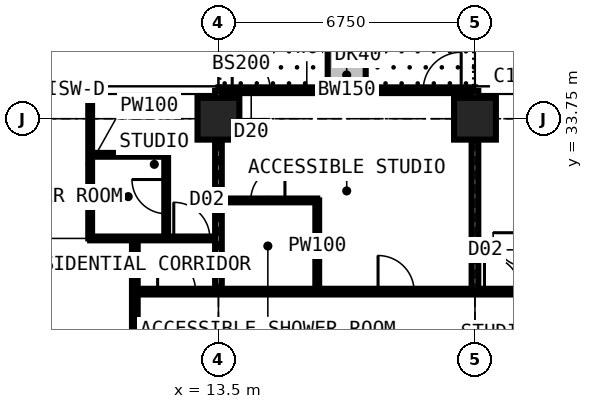
"""IFC4 building model, lengths in metres.
Left out: names, types, materials, properties, quantities, classifications, styles, units other than length and angle.
Written with IfcOpenShell. Run it as: python <this file> out.ifc"""

import sys

from ifc_helpers import new_model, si_unit, direction, frame, frame_2d, origin, origin_2d, place, context, subcontext, project, spatial, rectangle, extrude, element, fill, save


model = new_model("IFC4")
c1 = context("Model", 3, precision=1e-05, world=origin(), true_north=direction((0.0, 1.0)))
c2 = subcontext(c1, "Body", "Model", "MODEL_VIEW")
j1 = project(units=[si_unit("LENGTHUNIT", "METRE"), si_unit("PLANEANGLEUNIT", "RADIAN")], contexts=[c1])
p1 = place(None, origin())
s1 = spatial("IfcSite", under=j1, at=p1, CompositionType="ELEMENT")
p2 = place(p1, origin())
s2 = spatial("IfcBuilding", under=s1, at=p2, CompositionType="ELEMENT")
p3 = place(p2, frame((0.0, 0.0, 218.7)))
s3 = spatial("IfcBuildingStorey", under=s2, at=p3, CompositionType="ELEMENT", Elevation=218.7)
for number, where, z_axis, x_axis in (
    (1, (13.5, 33.75, 0.0), (0.0, 0.0, 1.0), (1.0, 0.0, 0.0)),
    (2, (20.25, 33.75, 0.0), (0.0, 0.0, 1.0), (1.0, 0.0, 0.0)),
):
    element("IfcColumn", number, at=place(p3, frame(where, z_axis=z_axis, x_axis=x_axis)), inside=s3, PredefinedType="COLUMN", context=c2, shape_type="SweptSolid", body=[
        extrude(rectangle(XDim=1.1, YDim=1.1, at=origin_2d()), origin(), (0.0, 0.0, 1.0), 3.6),
    ])
p4 = place(p3, frame((13.5, 34.5, 0.0), z_axis=(0.0, 0.0, 1.0), x_axis=(1.0, 0.0, 0.0)))
e3 = element("IfcWall", 3, at=p4, inside=s3, PredefinedType="SOLIDWALL", context=c2, shape_type="SweptSolid", body=[
    extrude(rectangle(XDim=6.75, YDim=0.15, at=frame_2d((3.375, 0.0))), origin(), (0.0, 0.0, 1.0), 3.375),
])
p5 = place(p4, frame((0.363, 0.0, 0.0)))
e4 = element("IfcOpeningElement", 4, at=p5, cuts=e3, PredefinedType="OPENING", context=c2, shape_type="SweptSolid", body=[
    extrude(rectangle(XDim=1.0, YDim=2.2, at=frame_2d((0.5, 1.1))), frame((0.0, 0.085, 0.0), z_axis=(0.0, -1.0, 0.0), x_axis=(1.0, 0.0, 0.0)), (0.0, 0.0, 1.0), 0.17),
])
p6 = place(p4, frame((1.725, 0.0, 0.9)))
e5 = element("IfcOpeningElement", 5, at=p6, cuts=e3, PredefinedType="OPENING", context=c2, shape_type="SweptSolid", body=[
    extrude(rectangle(XDim=1.2, YDim=1.8, at=frame_2d((0.6, 0.9))), frame((0.0, 0.085, 0.0), z_axis=(0.0, -1.0, 0.0), x_axis=(1.0, 0.0, 0.0)), (0.0, 0.0, 1.0), 0.17),
])
p7 = place(p4, frame((5.387, 0.0, 0.0)))
e6 = element("IfcOpeningElement", 6, at=p7, cuts=e3, PredefinedType="OPENING", context=c2, shape_type="SweptSolid", body=[
    extrude(rectangle(XDim=1.0, YDim=2.2, at=frame_2d((0.5, 1.1))), frame((0.0, 0.085, 0.0), z_axis=(0.0, -1.0, 0.0), x_axis=(1.0, 0.0, 0.0)), (0.0, 0.0, 1.0), 0.17),
])
p8 = place(p4, frame((3.825, 0.0, 0.9)))
e7 = element("IfcOpeningElement", 7, at=p8, cuts=e3, PredefinedType="OPENING", context=c2, shape_type="SweptSolid", body=[
    extrude(rectangle(XDim=1.2, YDim=1.8, at=frame_2d((0.6, 0.9))), frame((0.0, 0.085, 0.0), z_axis=(0.0, -1.0, 0.0), x_axis=(1.0, 0.0, 0.0)), (0.0, 0.0, 1.0), 0.17),
])
p9 = place(p3, frame((16.875, 34.6, 0.0), z_axis=(0.0, 0.0, 1.0), x_axis=(0.0, 1.0, 0.0)))
e8 = element("IfcWall", 8, at=p9, inside=s3, PredefinedType="USERDEFINED", context=c2, shape_type="SweptSolid", body=[
    extrude(rectangle(XDim=2.2, YDim=1.0, at=frame_2d((1.1, 0.0))), origin(), (0.0, 0.0, 1.0), 0.9),
])
p10 = place(p3, frame((10.125, 30.6, 0.0), z_axis=(0.0, 0.0, 1.0), x_axis=(0.0, 1.0, 0.0)))
e9 = element("IfcWall", 9, at=p10, inside=s3, PredefinedType="PARTITIONING", context=c2, shape_type="SweptSolid", body=[
    extrude(rectangle(XDim=3.884, YDim=0.1, at=frame_2d((1.942, 0.0))), origin(), (0.0, 0.0, 1.0), 3.375),
])
p11 = place(p3, frame((10.125, 30.6, 0.0), z_axis=(0.0, 0.0, 1.0), x_axis=(1.0, 0.0, 0.0)))
e10 = element("IfcWall", 10, at=p11, inside=s3, PredefinedType="PARTITIONING", context=c2, shape_type="SweptSolid", body=[
    extrude(rectangle(XDim=3.375, YDim=0.1, at=frame_2d((1.688, 0.0))), origin(), (0.0, 0.0, 1.0), 3.375),
])
p12 = place(p11, frame((2.2, 0.0, 0.0)))
e11 = element("IfcOpeningElement", 11, at=p12, cuts=e10, PredefinedType="OPENING", context=c2, shape_type="SweptSolid", body=[
    extrude(rectangle(XDim=0.95, YDim=2.2, at=frame_2d((0.475, 1.1))), frame((0.0, 0.06, 0.0), z_axis=(0.0, -1.0, 0.0), x_axis=(1.0, 0.0, 0.0)), (0.0, 0.0, 1.0), 0.12),
])
p13 = place(p3, frame((10.125, 32.8, 0.0), z_axis=(0.0, 0.0, 1.0), x_axis=(1.0, 0.0, 0.0)))
e12 = element("IfcWall", 12, at=p13, inside=s3, PredefinedType="PARTITIONING", context=c2, shape_type="SweptSolid", body=[
    extrude(rectangle(XDim=2.0, YDim=0.1, at=frame_2d((1.0, 0.0))), origin(), (0.0, 0.0, 1.0), 3.375),
])
p14 = place(p3, frame((11.3, 11.3, 0.0), z_axis=(0.0, 0.0, 1.0), x_axis=(0.0, 1.0, 0.0)))
e13 = element("IfcWall", 13, at=p14, inside=s3, PredefinedType="PARTITIONING", context=c2, shape_type="SweptSolid", body=[
    extrude(rectangle(XDim=19.3, YDim=0.15, at=frame_2d((9.65, 0.0))), origin(), (0.0, 0.0, 1.0), 3.375),
])
p15 = place(p14, frame((13.525, 0.0, 0.0)))
e14 = element("IfcOpeningElement", 14, at=p15, cuts=e13, PredefinedType="OPENING", context=c2, shape_type="SweptSolid", body=[
    extrude(rectangle(XDim=1.0, YDim=2.2, at=frame_2d((0.5, 1.1))), frame((0.0, 0.085, 0.0), z_axis=(0.0, -1.0, 0.0), x_axis=(1.0, 0.0, 0.0)), (0.0, 0.0, 1.0), 0.17),
])
p16 = place(p14, frame((10.438, 0.0, 0.0)))
e15 = element("IfcOpeningElement", 15, at=p16, cuts=e13, PredefinedType="OPENING", context=c2, shape_type="SweptSolid", body=[
    extrude(rectangle(XDim=1.0, YDim=2.2, at=frame_2d((0.5, 1.1))), frame((0.0, 0.085, 0.0), z_axis=(0.0, -1.0, 0.0), x_axis=(1.0, 0.0, 0.0)), (0.0, 0.0, 1.0), 0.17),
])
p17 = place(p3, frame((11.3, 29.2, 0.0), z_axis=(0.0, 0.0, 1.0), x_axis=(1.0, 0.0, 0.0)))
e16 = element("IfcWall", 16, at=p17, inside=s3, PredefinedType="PARTITIONING", context=c2, shape_type="SweptSolid", body=[
    extrude(rectangle(XDim=19.809, YDim=0.15, at=frame_2d((9.904, 0.0))), origin(), (0.0, 0.0, 1.0), 3.375),
])
p18 = place(p17, frame((14.625, 0.0, 0.0)))
e17 = element("IfcOpeningElement", 17, at=p18, cuts=e16, PredefinedType="OPENING", context=c2, shape_type="SweptSolid", body=[
    extrude(rectangle(XDim=1.0, YDim=2.2, at=frame_2d((0.5, 1.1))), frame((0.0, 0.085, 0.0), z_axis=(0.0, -1.0, 0.0), x_axis=(1.0, 0.0, 0.0)), (0.0, 0.0, 1.0), 0.17),
])
p19 = place(p17, frame((6.4, 0.0, 0.0)))
e18 = element("IfcOpeningElement", 18, at=p19, cuts=e16, PredefinedType="OPENING", context=c2, shape_type="SweptSolid", body=[
    extrude(rectangle(XDim=0.95, YDim=2.2, at=frame_2d((0.475, 1.1))), frame((0.0, 0.085, 0.0), z_axis=(0.0, -1.0, 0.0), x_axis=(1.0, 0.0, 0.0)), (0.0, 0.0, 1.0), 0.17),
])
p20 = place(p17, frame((9.2, 0.0, 0.0)))
e19 = element("IfcOpeningElement", 19, at=p20, cuts=e16, PredefinedType="OPENING", context=c2, shape_type="SweptSolid", body=[
    extrude(rectangle(XDim=0.95, YDim=2.2, at=frame_2d((0.475, 1.1))), frame((0.0, 0.085, 0.0), z_axis=(0.0, -1.0, 0.0), x_axis=(1.0, 0.0, 0.0)), (0.0, 0.0, 1.0), 0.17),
])
p21 = place(p17, frame((0.6, 0.0, 0.0)))
e20 = element("IfcOpeningElement", 20, at=p21, cuts=e16, PredefinedType="OPENING", context=c2, shape_type="SweptSolid", body=[
    extrude(rectangle(XDim=1.0, YDim=2.2, at=frame_2d((0.5, 1.1))), frame((0.0, 0.085, 0.0), z_axis=(0.0, -1.0, 0.0), x_axis=(1.0, 0.0, 0.0)), (0.0, 0.0, 1.0), 0.17),
])
p22 = place(p3, frame((12.125, 30.6, 0.0), z_axis=(0.0, 0.0, 1.0), x_axis=(0.0, 1.0, 0.0)))
e21 = element("IfcWall", 21, at=p22, inside=s3, PredefinedType="PARTITIONING", context=c2, shape_type="SweptSolid", body=[
    extrude(rectangle(XDim=2.2, YDim=0.1, at=frame_2d((1.1, 0.0))), origin(), (0.0, 0.0, 1.0), 3.375),
])
p23 = place(p22, frame((0.65, 0.0, 0.0)))
e22 = element("IfcOpeningElement", 22, at=p23, cuts=e21, PredefinedType="OPENING", context=c2, shape_type="SweptSolid", body=[
    extrude(rectangle(XDim=0.9, YDim=2.2, at=frame_2d((0.45, 1.1))), frame((0.0, 0.06, 0.0), z_axis=(0.0, -1.0, 0.0), x_axis=(1.0, 0.0, 0.0)), (0.0, 0.0, 1.0), 0.12),
])
p24 = place(p3, frame((13.5, 29.2, 0.0), z_axis=(0.0, 0.0, 1.0), x_axis=(0.0, 1.0, 0.0)))
e23 = element("IfcWall", 23, at=p24, inside=s3, PredefinedType="PARTITIONING", context=c2, shape_type="SweptSolid", body=[
    extrude(rectangle(XDim=5.284, YDim=0.175, at=frame_2d((2.642, 0.0))), origin(), (0.0, 0.0, 1.0), 2.877),
])
p25 = place(p3, frame((13.5, 31.6, 0.0), z_axis=(0.0, 0.0, 1.0), x_axis=(1.0, 0.0, 0.0)))
e24 = element("IfcWall", 24, at=p25, inside=s3, PredefinedType="PARTITIONING", context=c2, shape_type="SweptSolid", body=[
    extrude(rectangle(XDim=2.6, YDim=0.1, at=frame_2d((1.3, 0.0))), origin(), (0.0, 0.0, 1.0), 3.375),
])
p26 = place(p25, frame((0.85, 0.0, 0.0)))
e25 = element("IfcOpeningElement", 25, at=p26, cuts=e24, PredefinedType="OPENING", context=c2, shape_type="SweptSolid", body=[
    extrude(rectangle(XDim=0.9, YDim=2.2, at=frame_2d((0.45, 1.1))), frame((0.0, 0.06, 0.0), z_axis=(0.0, -1.0, 0.0), x_axis=(1.0, 0.0, 0.0)), (0.0, 0.0, 1.0), 0.12),
])
p27 = place(p3, frame((16.1, 29.2, 0.0), z_axis=(0.0, 0.0, 1.0), x_axis=(0.0, 1.0, 0.0)))
e26 = element("IfcWall", 26, at=p27, inside=s3, PredefinedType="PARTITIONING", context=c2, shape_type="SweptSolid", body=[
    extrude(rectangle(XDim=2.4, YDim=0.1, at=frame_2d((1.2, 0.0))), origin(), (0.0, 0.0, 1.0), 3.375),
])
p28 = place(p3, frame((20.25, 29.2, 0.0), z_axis=(0.0, 0.0, 1.0), x_axis=(0.0, 1.0, 0.0)))
e27 = element("IfcWall", 27, at=p28, inside=s3, PredefinedType="PARTITIONING", context=c2, shape_type="SweptSolid", body=[
    extrude(rectangle(XDim=5.284, YDim=0.175, at=frame_2d((2.642, 0.0))), origin(), (0.0, 0.0, 1.0), 2.877),
])
p29 = place(p5, origin())
e28 = element("IfcDoor", 28, at=p29, inside=s3, OperationType="SINGLE_SWING_LEFT", PredefinedType="DOOR", context=c2, shape_type="SweptSolid", body=[
    extrude(rectangle(XDim=1.0, YDim=2.2, at=frame_2d((0.5, 1.1))), frame((0.0, 0.025, 0.0), z_axis=(0.0, -1.0, 0.0), x_axis=(1.0, 0.0, 0.0)), (0.0, 0.0, 1.0), 0.05),
])
fill(e4, e28)
p30 = place(p6, origin())
e29 = element("IfcWindow", 29, at=p30, inside=s3, PartitioningType="SINGLE_PANEL", PredefinedType="WINDOW", context=c2, shape_type="SweptSolid", body=[
    extrude(rectangle(XDim=1.2, YDim=1.8, at=frame_2d((0.6, 0.9))), frame((0.0, 0.03, 0.0), z_axis=(0.0, -1.0, 0.0), x_axis=(1.0, 0.0, 0.0)), (0.0, 0.0, 1.0), 0.06),
])
fill(e5, e29)
p31 = place(p7, origin())
e30 = element("IfcDoor", 30, at=p31, inside=s3, OperationType="SINGLE_SWING_RIGHT", PredefinedType="DOOR", context=c2, shape_type="SweptSolid", body=[
    extrude(rectangle(XDim=1.0, YDim=2.2, at=frame_2d((0.5, 1.1))), frame((0.0, 0.025, 0.0), z_axis=(0.0, -1.0, 0.0), x_axis=(1.0, 0.0, 0.0)), (0.0, 0.0, 1.0), 0.05),
])
fill(e6, e30)
p32 = place(p8, origin())
e31 = element("IfcWindow", 31, at=p32, inside=s3, PartitioningType="SINGLE_PANEL", PredefinedType="WINDOW", context=c2, shape_type="SweptSolid", body=[
    extrude(rectangle(XDim=1.2, YDim=1.8, at=frame_2d((0.6, 0.9))), frame((0.0, 0.03, 0.0), z_axis=(0.0, -1.0, 0.0), x_axis=(1.0, 0.0, 0.0)), (0.0, 0.0, 1.0), 0.06),
])
fill(e7, e31)
p33 = place(p19, origin())
e32 = element("IfcDoor", 32, at=p33, inside=s3, OperationType="SINGLE_SWING_LEFT", PredefinedType="DOOR", context=c2, shape_type="SweptSolid", body=[
    extrude(rectangle(XDim=0.95, YDim=2.2, at=frame_2d((0.475, 1.1))), frame((0.0, 0.025, 0.0), z_axis=(0.0, -1.0, 0.0), x_axis=(1.0, 0.0, 0.0)), (0.0, 0.0, 1.0), 0.05),
])
fill(e18, e32)
p34 = place(p26, origin())
e33 = element("IfcDoor", 33, at=p34, inside=s3, OperationType="SINGLE_SWING_RIGHT", PredefinedType="DOOR", context=c2, shape_type="SweptSolid", body=[
    extrude(rectangle(XDim=0.9, YDim=2.2, at=frame_2d((0.45, 1.1))), frame((0.0, 0.025, 0.0), z_axis=(0.0, -1.0, 0.0), x_axis=(1.0, 0.0, 0.0)), (0.0, 0.0, 1.0), 0.05),
])
fill(e25, e33)
p35 = place(p12, origin())
e34 = element("IfcDoor", 34, at=p35, inside=s3, OperationType="SINGLE_SWING_LEFT", PredefinedType="DOOR", context=c2, shape_type="SweptSolid", body=[
    extrude(rectangle(XDim=0.95, YDim=2.2, at=frame_2d((0.475, 1.1))), frame((0.0, 0.025, 0.0), z_axis=(0.0, -1.0, 0.0), x_axis=(1.0, 0.0, 0.0)), (0.0, 0.0, 1.0), 0.05),
])
fill(e11, e34)
p36 = place(p23, origin())
e35 = element("IfcDoor", 35, at=p36, inside=s3, OperationType="SINGLE_SWING_RIGHT", PredefinedType="DOOR", context=c2, shape_type="SweptSolid", body=[
    extrude(rectangle(XDim=0.9, YDim=2.2, at=frame_2d((0.45, 1.1))), frame((0.0, 0.025, 0.0), z_axis=(0.0, -1.0, 0.0), x_axis=(1.0, 0.0, 0.0)), (0.0, 0.0, 1.0), 0.05),
])
fill(e22, e35)
p37 = place(p20, origin())
e36 = element("IfcDoor", 36, at=p37, inside=s3, OperationType="SINGLE_SWING_LEFT", PredefinedType="DOOR", context=c2, shape_type="SweptSolid", body=[
    extrude(rectangle(XDim=0.95, YDim=2.2, at=frame_2d((0.475, 1.1))), frame((0.0, 0.025, 0.0), z_axis=(0.0, -1.0, 0.0), x_axis=(1.0, 0.0, 0.0)), (0.0, 0.0, 1.0), 0.05),
])
fill(e19, e36)
p38 = place(p21, origin())
e37 = element("IfcDoor", 37, at=p38, inside=s3, OperationType="SINGLE_SWING_LEFT", PredefinedType="DOOR", context=c2, shape_type="SweptSolid", body=[
    extrude(rectangle(XDim=1.0, YDim=2.2, at=frame_2d((0.5, 1.1))), frame((0.0, 0.025, 0.0), z_axis=(0.0, -1.0, 0.0), x_axis=(1.0, 0.0, 0.0)), (0.0, 0.0, 1.0), 0.05),
])
fill(e20, e37)
save(model, sys.argv[1])
